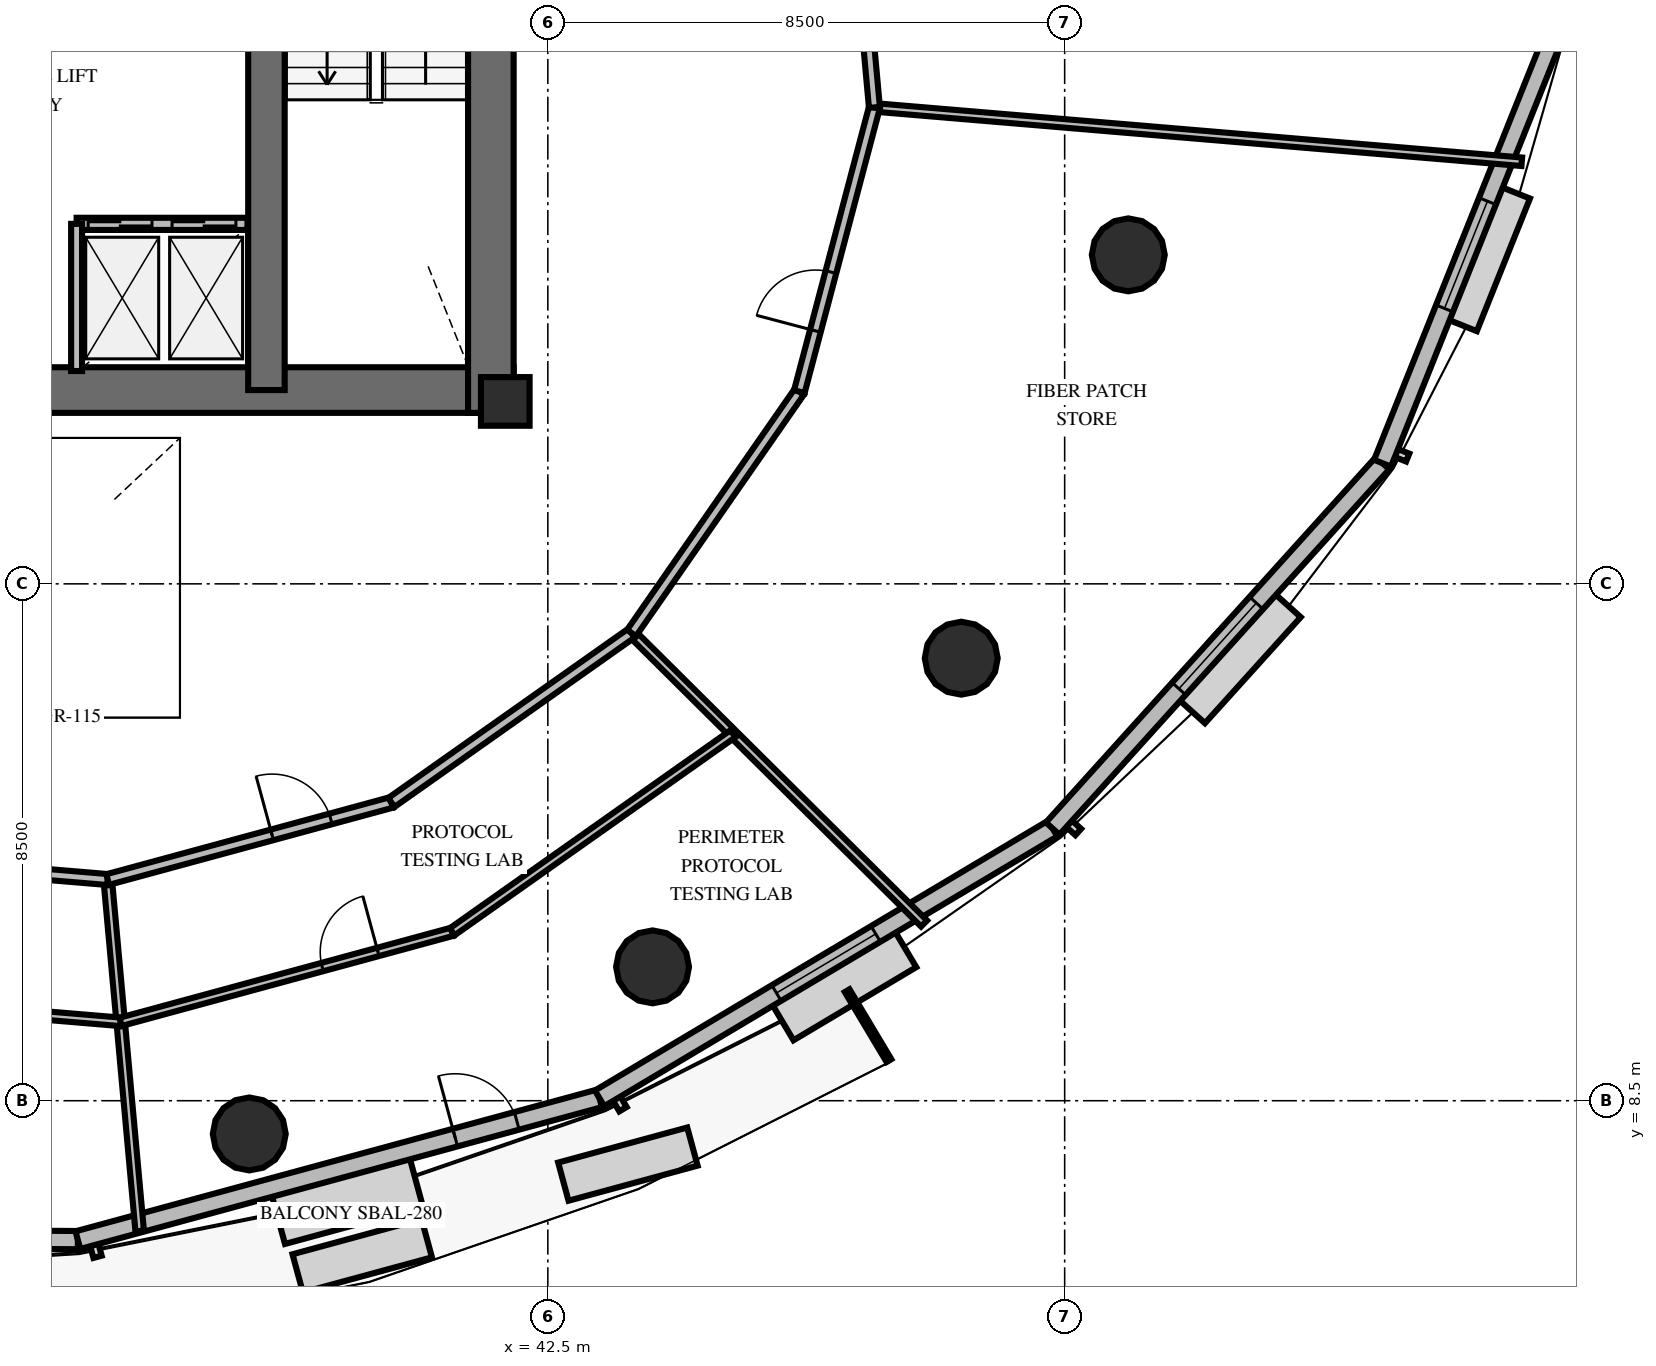
"""IFC4 building model, lengths in metres.
Left out: names, types, materials, properties, quantities, classifications, styles, units other than length and angle.
Written with IfcOpenShell. Run it as: python <this file> out.ifc"""

import sys

from ifc_helpers import new_model, si_unit, direction, frame, frame_2d, origin, origin_2d, place, context, subcontext, project, spatial, rectangle, circle, extrude, element, fill, save


model = new_model("IFC4")
c1 = context("Model", 3, precision=1e-05, world=origin(), true_north=direction((0.0, 1.0)))
c2 = subcontext(c1, "Body", "Model", "MODEL_VIEW")
j1 = project(units=[si_unit("LENGTHUNIT", "METRE"), si_unit("PLANEANGLEUNIT", "RADIAN")], contexts=[c1])
p1 = place(None, origin())
s1 = spatial("IfcSite", under=j1, at=p1, CompositionType="ELEMENT")
p2 = place(p1, origin())
s2 = spatial("IfcBuilding", under=s1, at=p2, CompositionType="ELEMENT")
p3 = place(p2, frame((0.0, 0.0, 97.8)))
s3 = spatial("IfcBuildingStorey", under=s2, at=p3, CompositionType="ELEMENT", Elevation=97.8)
p4 = place(p3, frame((26.072, 20.187, 0.0), z_axis=(0.0, 0.0, 1.0), x_axis=(1.0, 0.0, 0.0)))
e1 = element("IfcWall", 1, at=p4, inside=s3, PredefinedType="SHEAR", context=c2, shape_type="SweptSolid", body=[
    extrude(rectangle(XDim=15.866, YDim=0.75, at=frame_2d((7.933, 0.0))), origin(), (0.0, 0.0, 1.0), 4.0),
])
p5 = place(p3, frame((41.563, 19.812, 0.0), z_axis=(0.0, 0.0, 1.0), x_axis=(0.0, 1.0, 0.0)))
e2 = element("IfcWall", 2, at=p5, inside=s3, PredefinedType="SHEAR", context=c2, shape_type="SweptSolid", body=[
    extrude(rectangle(XDim=10.576, YDim=0.75, at=frame_2d((5.288, 0.0))), origin(), (0.0, 0.0, 1.0), 4.0),
])
p6 = place(p3, frame((37.872, 20.187, 0.0), z_axis=(0.0, 0.0, 1.0), x_axis=(0.0, 1.0, 0.0)))
e3 = element("IfcWall", 3, at=p6, inside=s3, PredefinedType="SHEAR", context=c2, shape_type="SweptSolid", body=[
    extrude(rectangle(XDim=9.826, YDim=0.6, at=frame_2d((4.913, 0.0))), origin(), (0.0, 0.0, 1.0), 4.0),
])
p7 = place(p3, frame((41.8, 20.0, 0.0), z_axis=(0.0, 0.0, 1.0), x_axis=(1.0, 0.0, 0.0)))
e4 = element("IfcColumn", 4, at=p7, inside=s3, PredefinedType="PILASTER", context=c2, shape_type="SweptSolid", body=[
    extrude(rectangle(XDim=0.8, YDim=0.8, at=origin_2d()), origin(), (0.0, 0.0, 1.0), 4.0),
])
for number, where, z_axis, x_axis in (
    (5, (37.59, 7.954, 0.0), (0.0, 0.0, 1.0), (1.0, 0.0, 0.0)),
    (6, (44.222, 10.701, 0.0), (0.0, 0.0, 1.0), (1.0, 0.0, 0.0)),
    (7, (49.299, 15.778, 0.0), (0.0, 0.0, 1.0), (1.0, 0.0, 0.0)),
    (8, (52.046, 22.41, 0.0), (0.0, 0.0, 1.0), (1.0, 0.0, 0.0)),
):
    element("IfcColumn", number, at=place(p3, frame(where, z_axis=z_axis, x_axis=x_axis)), inside=s3, PredefinedType="COLUMN", context=c2, shape_type="SweptSolid", body=[
        extrude(circle(Radius=0.6, at=origin_2d()), origin(), (0.0, 0.0, 1.0), 4.0),
    ])
p8 = place(p3, frame((26.098, 6.264, 0.0), z_axis=(0.0, 0.0, 1.0), x_axis=(0.999979041109, -0.006474360417, 0.0)))
e9 = element("IfcWall", 9, at=p8, inside=s3, PredefinedType="SOLIDWALL", context=c2, shape_type="SweptSolid", body=[
    extrude(rectangle(XDim=8.673, YDim=0.3, at=frame_2d((4.336, 0.0))), origin(), (0.0, 0.0, 1.0), 2.9),
])
p9 = place(p8, frame((3.386, 0.0, 0.8)))
e10 = element("IfcOpeningElement", 10, at=p9, cuts=e9, PredefinedType="OPENING", context=c2, shape_type="SweptSolid", body=[
    extrude(rectangle(XDim=1.9, YDim=1.95, at=frame_2d((0.95, 0.975))), frame((0.0, 0.16, 0.0), z_axis=(0.0, -1.0, 0.0), x_axis=(1.0, 0.0, 0.0)), (0.0, 0.0, 1.0), 0.32),
])
p10 = place(p3, frame((34.771, 6.208, 0.0), z_axis=(0.0, 0.0, 1.0), x_axis=(0.965015591798, 0.26219250101, 0.0)))
e11 = element("IfcWall", 11, at=p10, inside=s3, PredefinedType="SOLIDWALL", context=c2, shape_type="SweptSolid", body=[
    extrude(rectangle(XDim=8.891, YDim=0.3, at=frame_2d((4.445, 0.0))), origin(), (0.0, 0.0, 1.0), 2.9),
])
p11 = place(p10, frame((6.43, 0.0, 0.0)))
e12 = element("IfcOpeningElement", 12, at=p11, cuts=e11, PredefinedType="OPENING", context=c2, shape_type="SweptSolid", body=[
    extrude(rectangle(XDim=1.05, YDim=2.15, at=frame_2d((0.525, 1.075))), frame((0.0, 0.16, 0.0), z_axis=(0.0, -1.0, 0.0), x_axis=(1.0, 0.0, 0.0)), (0.0, 0.0, 1.0), 0.32),
])
p12 = place(p3, frame((43.351, 8.539, 0.0), z_axis=(0.0, 0.0, 1.0), x_axis=(0.859224239548, 0.511599165532, 0.0)))
e13 = element("IfcWall", 13, at=p12, inside=s3, PredefinedType="SOLIDWALL", context=c2, shape_type="SweptSolid", body=[
    extrude(rectangle(XDim=8.673, YDim=0.3, at=frame_2d((4.336, 0.0))), origin(), (0.0, 0.0, 1.0), 2.9),
])
p13 = place(p12, frame((3.386, 0.0, 0.8)))
e14 = element("IfcOpeningElement", 14, at=p13, cuts=e13, PredefinedType="OPENING", context=c2, shape_type="SweptSolid", body=[
    extrude(rectangle(XDim=1.9, YDim=1.95, at=frame_2d((0.95, 0.975))), frame((0.0, 0.16, 0.0), z_axis=(0.0, -1.0, 0.0), x_axis=(1.0, 0.0, 0.0)), (0.0, 0.0, 1.0), 0.32),
])
p14 = place(p3, frame((50.802, 12.976, 0.0), z_axis=(0.0, 0.0, 1.0), x_axis=(0.670180169564, 0.742198450768, 0.0)))
e15 = element("IfcWall", 15, at=p14, inside=s3, PredefinedType="SOLIDWALL", context=c2, shape_type="SweptSolid", body=[
    extrude(rectangle(XDim=8.095, YDim=0.3, at=frame_2d((4.048, 0.0))), origin(), (0.0, 0.0, 1.0), 2.9),
])
p15 = place(p14, frame((3.098, 0.0, 0.8)))
e16 = element("IfcOpeningElement", 16, at=p15, cuts=e15, PredefinedType="OPENING", context=c2, shape_type="SweptSolid", body=[
    extrude(rectangle(XDim=1.9, YDim=1.95, at=frame_2d((0.95, 0.975))), frame((0.0, 0.16, 0.0), z_axis=(0.0, -1.0, 0.0), x_axis=(1.0, 0.0, 0.0)), (0.0, 0.0, 1.0), 0.32),
])
p16 = place(p3, frame((56.228, 18.984, 0.0), z_axis=(0.0, 0.0, 1.0), x_axis=(0.371704219928, 0.928351212035, 0.0)))
e17 = element("IfcWall", 17, at=p16, inside=s3, PredefinedType="SOLIDWALL", context=c2, shape_type="SweptSolid", body=[
    extrude(rectangle(XDim=7.383, YDim=0.3, at=frame_2d((3.692, 0.0))), origin(), (0.0, 0.0, 1.0), 2.9),
])
p17 = place(p16, frame((2.742, 0.0, 0.8)))
e18 = element("IfcOpeningElement", 18, at=p17, cuts=e17, PredefinedType="OPENING", context=c2, shape_type="SweptSolid", body=[
    extrude(rectangle(XDim=1.9, YDim=1.95, at=frame_2d((0.95, 0.975))), frame((0.0, 0.16, 0.0), z_axis=(0.0, -1.0, 0.0), x_axis=(1.0, 0.0, 0.0)), (0.0, 0.0, 1.0), 0.32),
])
p18 = place(p3, frame((34.75, 22.92, 0.0), z_axis=(0.0, 0.0, 1.0), x_axis=(1.0, 0.0, 0.0)))
e19 = element("IfcWall", 19, at=p18, inside=s3, PredefinedType="SOLIDWALL", context=c2, shape_type="SweptSolid", body=[
    extrude(rectangle(XDim=2.81, YDim=0.2, at=frame_2d((1.405, 0.0))), origin(), (0.0, 0.0, 1.0), 2.8),
])
p19 = place(p18, frame((0.19, 0.0, 0.0)))
e20 = element("IfcOpeningElement", 20, at=p19, cuts=e19, PredefinedType="OPENING", context=c2, shape_type="SweptSolid", body=[
    extrude(rectangle(XDim=1.05, YDim=2.1, at=frame_2d((0.525, 1.05))), frame((0.0, 0.11, 0.0), z_axis=(0.0, -1.0, 0.0), x_axis=(1.0, 0.0, 0.0)), (0.0, 0.0, 1.0), 0.22),
])
p20 = place(p18, frame((1.57, 0.0, 0.0)))
e21 = element("IfcOpeningElement", 21, at=p20, cuts=e19, PredefinedType="OPENING", context=c2, shape_type="SweptSolid", body=[
    extrude(rectangle(XDim=1.05, YDim=2.1, at=frame_2d((0.525, 1.05))), frame((0.0, 0.11, 0.0), z_axis=(0.0, -1.0, 0.0), x_axis=(1.0, 0.0, 0.0)), (0.0, 0.0, 1.0), 0.22),
])
p21 = place(p3, frame((34.75, 20.5, 0.0), z_axis=(0.0, 0.0, 1.0), x_axis=(0.0, 1.0, 0.0)))
e22 = element("IfcWall", 22, at=p21, inside=s3, PredefinedType="SOLIDWALL", context=c2, shape_type="SweptSolid", body=[
    extrude(rectangle(XDim=2.42, YDim=0.18, at=frame_2d((1.21, 0.0))), origin(), (0.0, 0.0, 1.0), 2.8),
])
p22 = place(p3, frame((35.262, 12.137, 0.0), z_axis=(0.0, 0.0, 1.0), x_axis=(0.090615399913, -0.995885961995, 0.0)))
e23 = element("IfcWall", 23, at=p22, inside=s3, PredefinedType="PARTITIONING", context=c2, shape_type="SweptSolid", body=[
    extrude(rectangle(XDim=5.803, YDim=0.14, at=frame_2d((2.902, 0.0))), origin(), (0.0, 0.0, 1.0), 2.8),
])
p23 = place(p3, frame((30.444, 12.542, 0.0), z_axis=(0.0, 0.0, 1.0), x_axis=(0.996492970022, -0.083676524164, 0.0)))
e24 = element("IfcWall", 24, at=p23, inside=s3, PredefinedType="PARTITIONING", context=c2, shape_type="SweptSolid", body=[
    extrude(rectangle(XDim=4.834, YDim=0.18, at=frame_2d((2.417, 0.0))), origin(), (0.0, 0.0, 1.0), 2.8),
])
p24 = place(p23, frame((2.801, 0.0, 0.0)))
e25 = element("IfcOpeningElement", 25, at=p24, cuts=e24, PredefinedType="OPENING", context=c2, shape_type="SweptSolid", body=[
    extrude(rectangle(XDim=1.0, YDim=2.15, at=frame_2d((0.5, 1.075))), frame((0.0, 0.1, 0.0), z_axis=(0.0, -1.0, 0.0), x_axis=(1.0, 0.0, 0.0)), (0.0, 0.0, 1.0), 0.2),
])
p25 = place(p3, frame((29.844, 10.27, 0.0), z_axis=(0.0, 0.0, 1.0), x_axis=(0.996495215898, -0.083649774009, 0.0)))
e26 = element("IfcWall", 26, at=p25, inside=s3, PredefinedType="PARTITIONING", context=c2, shape_type="SweptSolid", body=[
    extrude(rectangle(XDim=5.65, YDim=0.14, at=frame_2d((2.825, 0.0))), origin(), (0.0, 0.0, 1.0), 2.8),
])
p26 = place(p25, frame((3.435, 0.0, 0.0)))
e27 = element("IfcOpeningElement", 27, at=p26, cuts=e26, PredefinedType="OPENING", context=c2, shape_type="SweptSolid", body=[
    extrude(rectangle(XDim=0.95, YDim=2.15, at=frame_2d((0.475, 1.075))), frame((0.0, 0.08, 0.0), z_axis=(0.0, -1.0, 0.0), x_axis=(1.0, 0.0, 0.0)), (0.0, 0.0, 1.0), 0.16),
])
p27 = place(p3, frame((43.877, 16.191, 0.0), z_axis=(0.0, 0.0, 1.0), x_axis=(0.709569136343, -0.704635821364, 0.0)))
e28 = element("IfcWall", 28, at=p27, inside=s3, PredefinedType="PARTITIONING", context=c2, shape_type="SweptSolid", body=[
    extrude(rectangle(XDim=6.78, YDim=0.14, at=frame_2d((3.39, 0.0))), origin(), (0.0, 0.0, 1.0), 2.8),
])
p28 = place(p3, frame((35.262, 12.137, 0.0), z_axis=(0.0, 0.0, 1.0), x_axis=(0.965010471878, 0.262211344463, 0.0)))
e29 = element("IfcWall", 29, at=p28, inside=s3, PredefinedType="PARTITIONING", context=c2, shape_type="SweptSolid", body=[
    extrude(rectangle(XDim=4.834, YDim=0.18, at=frame_2d((2.417, 0.0))), origin(), (0.0, 0.0, 1.0), 2.8),
])
p29 = place(p28, frame((2.801, 0.0, 0.0)))
e30 = element("IfcOpeningElement", 30, at=p29, cuts=e29, PredefinedType="OPENING", context=c2, shape_type="SweptSolid", body=[
    extrude(rectangle(XDim=1.0, YDim=2.15, at=frame_2d((0.5, 1.075))), frame((0.0, 0.1, 0.0), z_axis=(0.0, -1.0, 0.0), x_axis=(1.0, 0.0, 0.0)), (0.0, 0.0, 1.0), 0.2),
])
p30 = place(p3, frame((39.927, 13.405, 0.0), z_axis=(0.0, 0.0, 1.0), x_axis=(0.817155361581, 0.576417483288, 0.0)))
e31 = element("IfcWall", 31, at=p30, inside=s3, PredefinedType="PARTITIONING", context=c2, shape_type="SweptSolid", body=[
    extrude(rectangle(XDim=4.834, YDim=0.18, at=frame_2d((2.417, 0.0))), origin(), (0.0, 0.0, 1.0), 2.8),
])
p31 = place(p3, frame((35.475, 9.797, 0.0), z_axis=(0.0, 0.0, 1.0), x_axis=(0.96501961214, 0.262177703446, 0.0)))
e32 = element("IfcWall", 32, at=p31, inside=s3, PredefinedType="PARTITIONING", context=c2, shape_type="SweptSolid", body=[
    extrude(rectangle(XDim=5.651, YDim=0.14, at=frame_2d((2.825, 0.0))), origin(), (0.0, 0.0, 1.0), 2.8),
])
p32 = place(p31, frame((3.435, 0.0, 0.0)))
e33 = element("IfcOpeningElement", 33, at=p32, cuts=e32, PredefinedType="OPENING", context=c2, shape_type="SweptSolid", body=[
    extrude(rectangle(XDim=0.95, YDim=2.15, at=frame_2d((0.475, 1.075))), frame((0.0, 0.08, 0.0), z_axis=(0.0, -1.0, 0.0), x_axis=(1.0, 0.0, 0.0)), (0.0, 0.0, 1.0), 0.16),
])
p33 = place(p3, frame((40.927, 11.279, 0.0), z_axis=(0.0, 0.0, 1.0), x_axis=(0.817143849148, 0.576433803484, 0.0)))
e34 = element("IfcWall", 34, at=p33, inside=s3, PredefinedType="PARTITIONING", context=c2, shape_type="SweptSolid", body=[
    extrude(rectangle(XDim=5.65, YDim=0.14, at=frame_2d((2.825, 0.0))), origin(), (0.0, 0.0, 1.0), 2.8),
])
p34 = place(p3, frame((47.871, 24.835, 0.0), z_axis=(0.0, 0.0, 1.0), x_axis=(0.996492764064, -0.083678976863, 0.0)))
e35 = element("IfcWall", 35, at=p34, inside=s3, PredefinedType="PARTITIONING", context=c2, shape_type="SweptSolid", body=[
    extrude(rectangle(XDim=10.684, YDim=0.14, at=frame_2d((5.342, 0.0))), origin(), (0.0, 0.0, 1.0), 2.8),
])
p35 = place(p3, frame((43.877, 16.191, 0.0), z_axis=(0.0, 0.0, 1.0), x_axis=(0.570713758519, 0.8211490765, 0.0)))
e36 = element("IfcWall", 36, at=p35, inside=s3, PredefinedType="PARTITIONING", context=c2, shape_type="SweptSolid", body=[
    extrude(rectangle(XDim=4.834, YDim=0.18, at=frame_2d((2.417, 0.0))), origin(), (0.0, 0.0, 1.0), 2.8),
])
p36 = place(p3, frame((46.636, 20.161, 0.0), z_axis=(0.0, 0.0, 1.0), x_axis=(0.255430312845, 0.966827469241, 0.0)))
e37 = element("IfcWall", 37, at=p36, inside=s3, PredefinedType="PARTITIONING", context=c2, shape_type="SweptSolid", body=[
    extrude(rectangle(XDim=4.834, YDim=0.18, at=frame_2d((2.417, 0.0))), origin(), (0.0, 0.0, 1.0), 2.8),
])
p37 = place(p36, frame((1.034, 0.0, 0.0)))
e38 = element("IfcOpeningElement", 38, at=p37, cuts=e37, PredefinedType="OPENING", context=c2, shape_type="SweptSolid", body=[
    extrude(rectangle(XDim=1.0, YDim=2.15, at=frame_2d((0.5, 1.075))), frame((0.0, 0.1, 0.0), z_axis=(0.0, -1.0, 0.0), x_axis=(1.0, 0.0, 0.0)), (0.0, 0.0, 1.0), 0.2),
])
p38 = place(p3, frame((47.871, 24.835, 0.0), z_axis=(0.0, 0.0, 1.0), x_axis=(-0.090599493513, 0.995887409186, 0.0)))
e39 = element("IfcWall", 39, at=p38, inside=s3, PredefinedType="PARTITIONING", context=c2, shape_type="SweptSolid", body=[
    extrude(rectangle(XDim=4.834, YDim=0.18, at=frame_2d((2.417, 0.0))), origin(), (0.0, 0.0, 1.0), 2.8),
])
p39 = place(p11, origin())
e40 = element("IfcDoor", 40, at=p39, inside=s3, OperationType="SINGLE_SWING_LEFT", PredefinedType="DOOR", context=c2, shape_type="SweptSolid", body=[
    extrude(rectangle(XDim=1.05, YDim=2.15, at=frame_2d((0.525, 1.075))), frame((0.0, 0.025, 0.0), z_axis=(0.0, -1.0, 0.0), x_axis=(1.0, 0.0, 0.0)), (0.0, 0.0, 1.0), 0.05),
])
fill(e12, e40)
p40 = place(p13, origin())
e41 = element("IfcWindow", 41, at=p40, inside=s3, PartitioningType="SINGLE_PANEL", PredefinedType="WINDOW", context=c2, shape_type="SweptSolid", body=[
    extrude(rectangle(XDim=1.9, YDim=1.95, at=frame_2d((0.95, 0.975))), frame((0.0, 0.03, 0.0), z_axis=(0.0, -1.0, 0.0), x_axis=(1.0, 0.0, 0.0)), (0.0, 0.0, 1.0), 0.06),
])
fill(e14, e41)
p41 = place(p15, origin())
e42 = element("IfcWindow", 42, at=p41, inside=s3, PartitioningType="SINGLE_PANEL", PredefinedType="WINDOW", context=c2, shape_type="SweptSolid", body=[
    extrude(rectangle(XDim=1.9, YDim=1.95, at=frame_2d((0.95, 0.975))), frame((0.0, 0.03, 0.0), z_axis=(0.0, -1.0, 0.0), x_axis=(1.0, 0.0, 0.0)), (0.0, 0.0, 1.0), 0.06),
])
fill(e16, e42)
p42 = place(p17, origin())
e43 = element("IfcWindow", 43, at=p42, inside=s3, PartitioningType="SINGLE_PANEL", PredefinedType="WINDOW", context=c2, shape_type="SweptSolid", body=[
    extrude(rectangle(XDim=1.9, YDim=1.95, at=frame_2d((0.95, 0.975))), frame((0.0, 0.03, 0.0), z_axis=(0.0, -1.0, 0.0), x_axis=(1.0, 0.0, 0.0)), (0.0, 0.0, 1.0), 0.06),
])
fill(e18, e43)
p43 = place(p19, origin())
e44 = element("IfcDoor", 44, at=p43, inside=s3, OperationType="DOUBLE_DOOR_SLIDING", PredefinedType="USERDEFINED", context=c2, shape_type="SweptSolid", body=[
    extrude(rectangle(XDim=1.05, YDim=2.1, at=frame_2d((0.525, 1.05))), frame((0.0, 0.025, 0.0), z_axis=(0.0, -1.0, 0.0), x_axis=(1.0, 0.0, 0.0)), (0.0, 0.0, 1.0), 0.05),
])
fill(e20, e44)
p44 = place(p20, origin())
e45 = element("IfcDoor", 45, at=p44, inside=s3, OperationType="DOUBLE_DOOR_SLIDING", PredefinedType="USERDEFINED", context=c2, shape_type="SweptSolid", body=[
    extrude(rectangle(XDim=1.05, YDim=2.1, at=frame_2d((0.525, 1.05))), frame((0.0, 0.025, 0.0), z_axis=(0.0, -1.0, 0.0), x_axis=(1.0, 0.0, 0.0)), (0.0, 0.0, 1.0), 0.05),
])
fill(e21, e45)
p45 = place(p29, origin())
e46 = element("IfcDoor", 46, at=p45, inside=s3, OperationType="SINGLE_SWING_LEFT", PredefinedType="DOOR", context=c2, shape_type="SweptSolid", body=[
    extrude(rectangle(XDim=1.0, YDim=2.15, at=frame_2d((0.5, 1.075))), frame((0.0, 0.025, 0.0), z_axis=(0.0, -1.0, 0.0), x_axis=(1.0, 0.0, 0.0)), (0.0, 0.0, 1.0), 0.05),
])
fill(e30, e46)
p46 = place(p32, origin())
e47 = element("IfcDoor", 47, at=p46, inside=s3, OperationType="SINGLE_SWING_RIGHT", PredefinedType="DOOR", context=c2, shape_type="SweptSolid", body=[
    extrude(rectangle(XDim=0.95, YDim=2.15, at=frame_2d((0.475, 1.075))), frame((0.0, 0.025, 0.0), z_axis=(0.0, -1.0, 0.0), x_axis=(1.0, 0.0, 0.0)), (0.0, 0.0, 1.0), 0.05),
])
fill(e33, e47)
p47 = place(p37, origin())
e48 = element("IfcDoor", 48, at=p47, inside=s3, OperationType="SINGLE_SWING_LEFT", PredefinedType="DOOR", context=c2, shape_type="SweptSolid", body=[
    extrude(rectangle(XDim=1.0, YDim=2.15, at=frame_2d((0.5, 1.075))), frame((0.0, 0.025, 0.0), z_axis=(0.0, -1.0, 0.0), x_axis=(1.0, 0.0, 0.0)), (0.0, 0.0, 1.0), 0.05),
])
fill(e38, e48)
save(model, sys.argv[1])
